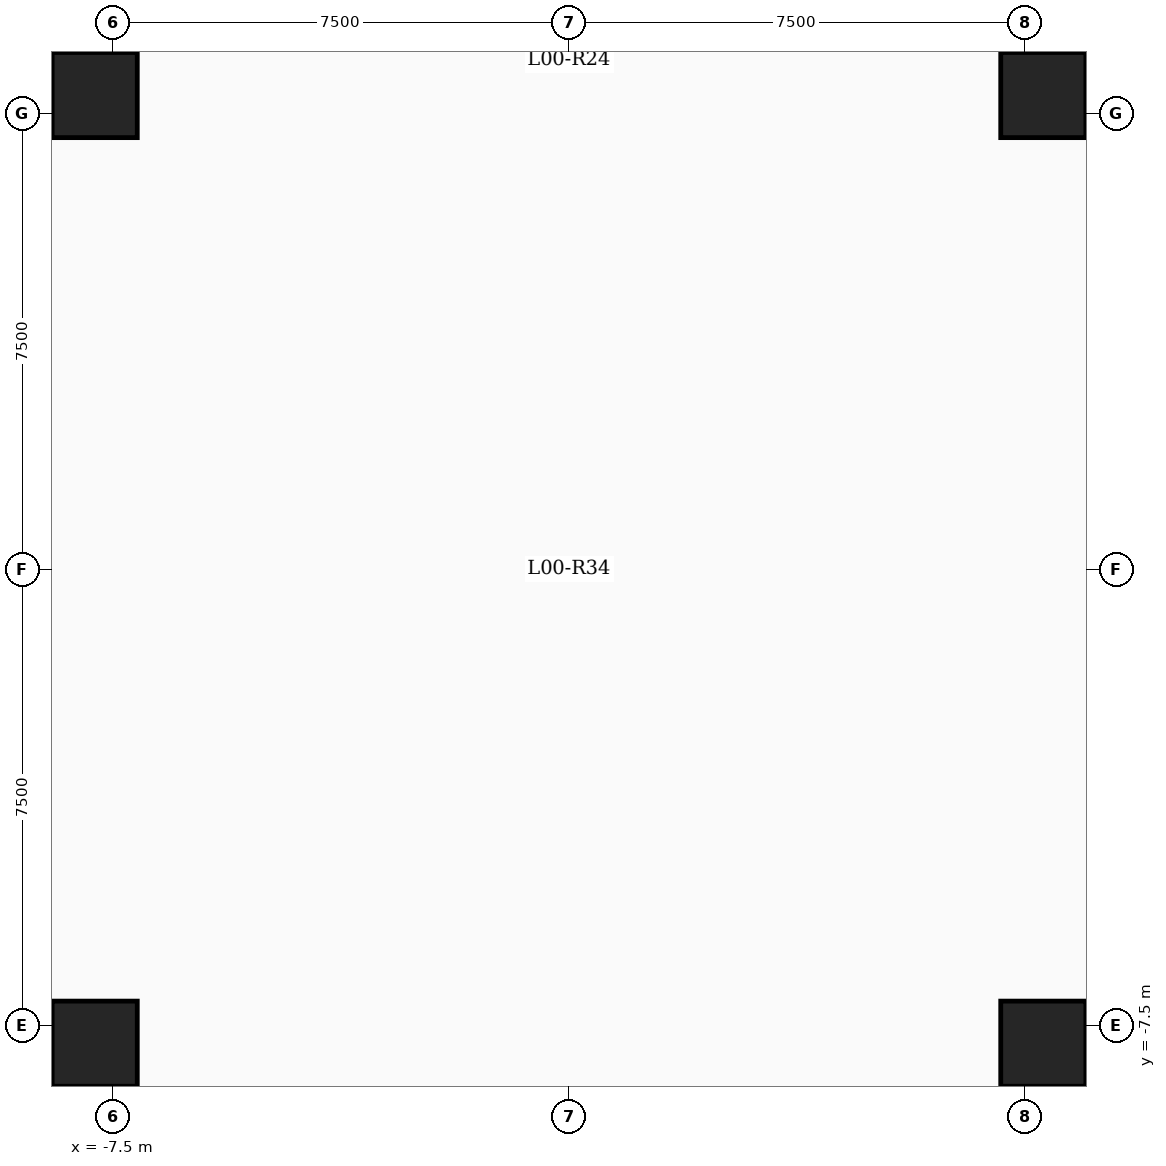
"""IFC4 building model, lengths in metres.
Left out: names, types, materials, properties, quantities, classifications, styles, units other than length and angle.
Written with IfcOpenShell. Run it as: python <this file> out.ifc"""

import sys

from ifc_helpers import new_model, si_unit, direction, frame, origin, origin_2d, place, context, subcontext, project, spatial, rectangle, extrude, element, save


model = new_model("IFC4")
c1 = context("Model", 3, precision=1e-05, world=origin(), true_north=direction((0.0, 1.0)))
c2 = subcontext(c1, "Body", "Model", "MODEL_VIEW")
j1 = project(units=[si_unit("LENGTHUNIT", "METRE"), si_unit("PLANEANGLEUNIT", "RADIAN")], contexts=[c1])
p1 = place(None, origin())
s1 = spatial("IfcSite", under=j1, at=p1, CompositionType="ELEMENT")
p2 = place(p1, origin())
s2 = spatial("IfcBuilding", under=s1, at=p2, CompositionType="ELEMENT")
p3 = place(p2, origin())
s3 = spatial("IfcBuildingStorey", under=s2, at=p3, CompositionType="ELEMENT", Elevation=0.0)
for number, where, z_axis, x_axis in (
    (1, (-7.8, -7.8, 0.0), (0.0, 0.0, 1.0), (1.0, 0.0, 0.0)),
    (2, (7.8, -7.8, 0.0), (0.0, 0.0, 1.0), (1.0, 0.0, 0.0)),
    (3, (-7.8, 7.8, 0.0), (0.0, 0.0, 1.0), (1.0, 0.0, 0.0)),
    (4, (7.8, 7.8, 0.0), (0.0, 0.0, 1.0), (1.0, 0.0, 0.0)),
):
    element("IfcColumn", number, at=place(p3, frame(where, z_axis=z_axis, x_axis=x_axis)), inside=s3, PredefinedType="COLUMN", context=c2, shape_type="SweptSolid", body=[
        extrude(rectangle(XDim=1.4, YDim=1.4, at=origin_2d()), origin(), (0.0, 0.0, 1.0), 5.4),
    ])
save(model, sys.argv[1])
